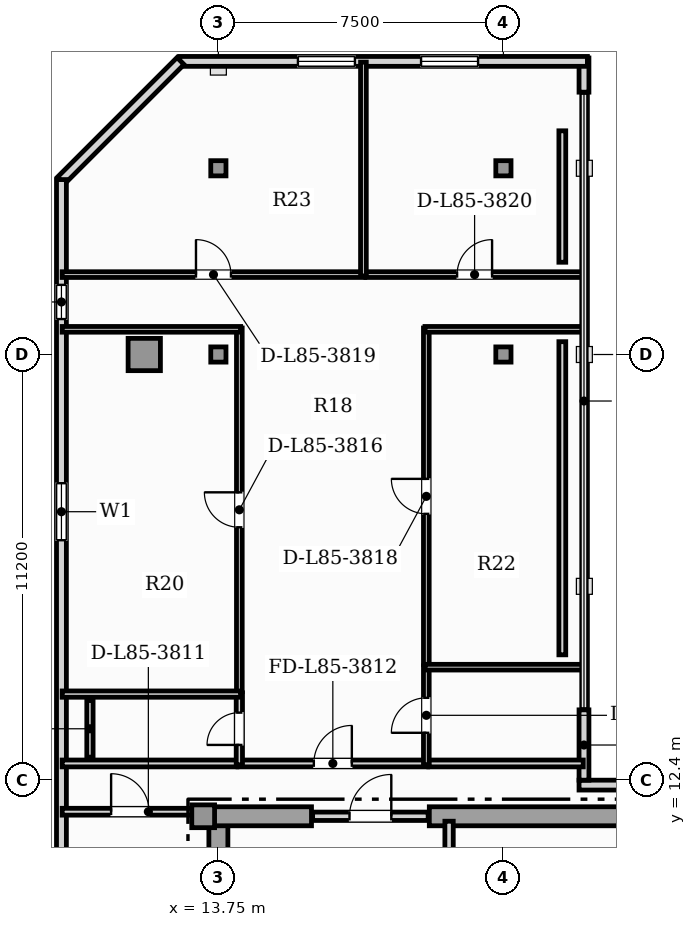
"""IFC4 building model, lengths in metres.
Left out: names, types, materials, properties, quantities, classifications, styles, units other than length and angle.
Written with IfcOpenShell. Run it as: python <this file> out.ifc"""

import sys

from ifc_helpers import new_model, si_unit, direction, frame, frame_2d, origin, origin_2d, place, context, subcontext, project, spatial, rectangle, hollow_rectangle, extrude, element, fill, save


model = new_model("IFC4")
c1 = context("Model", 3, precision=1e-05, world=origin(), true_north=direction((0.0, 1.0)))
c2 = subcontext(c1, "Body", "Model", "MODEL_VIEW")
j1 = project(units=[si_unit("LENGTHUNIT", "METRE"), si_unit("PLANEANGLEUNIT", "RADIAN")], contexts=[c1])
p1 = place(None, origin())
s1 = spatial("IfcSite", under=j1, at=p1, CompositionType="ELEMENT")
p2 = place(p1, origin())
s2 = spatial("IfcBuilding", under=s1, at=p2, CompositionType="ELEMENT")
p3 = place(p2, frame((0.0, 0.0, 345.2)))
s3 = spatial("IfcBuildingStorey", under=s2, at=p3, CompositionType="ELEMENT", Elevation=345.2)
p4 = place(p3, frame((13.75, 0.92, 0.0), z_axis=(0.0, 0.0, 1.0), x_axis=(0.0, 1.0, 0.0)))
e1 = element("IfcWall", 1, at=p4, inside=s3, PredefinedType="SHEAR", context=c2, shape_type="SweptSolid", body=[
    extrude(rectangle(XDim=10.53, YDim=0.5, at=frame_2d((5.265, 0.0))), origin(), (0.0, 0.0, 1.0), 3.59),
])
p5 = place(p3, frame((13.25, 11.45, 0.0), z_axis=(0.0, 0.0, 1.0), x_axis=(1.0, 0.0, 0.0)))
e2 = element("IfcWall", 2, at=p5, inside=s3, PredefinedType="SHEAR", context=c2, shape_type="SweptSolid", body=[
    extrude(rectangle(XDim=2.95, YDim=0.5, at=frame_2d((1.475, 0.0))), origin(), (0.0, 0.0, 1.0), 3.59),
])
p6 = place(p3, frame((19.3, 11.45, 0.0), z_axis=(0.0, 0.0, 1.0), x_axis=(1.0, 0.0, 0.0)))
e3 = element("IfcWall", 3, at=p6, inside=s3, PredefinedType="SHEAR", context=c2, shape_type="SweptSolid", body=[
    extrude(rectangle(XDim=7.3, YDim=0.5, at=frame_2d((3.65, 0.0))), origin(), (0.0, 0.0, 1.0), 3.59),
])
p7 = place(p3, frame((13.35, 11.45, 0.0), z_axis=(0.0, 0.0, 1.0), x_axis=(1.0, 0.0, 0.0)))
e4 = element("IfcColumn", 4, at=p7, inside=s3, PredefinedType="COLUMN", context=c2, shape_type="SweptSolid", body=[
    extrude(rectangle(XDim=0.6, YDim=0.6, at=origin_2d()), origin(), (0.0, 0.0, 1.0), 3.85),
])
p8 = place(p3, frame((11.8, 23.6, 0.0), z_axis=(0.0, 0.0, 1.0), x_axis=(1.0, 0.0, 0.0)))
e5 = element("IfcColumn", 5, at=p8, inside=s3, PredefinedType="USERDEFINED", context=c2, shape_type="SweptSolid", body=[
    extrude(hollow_rectangle(XDim=0.85, YDim=0.85, WallThickness=0.05, at=origin_2d()), origin(), (0.0, 0.0, 1.0), 3.85),
])
for number, where, z_axis, x_axis in (
    (6, (13.75, 23.6, 0.0), (0.0, 0.0, 1.0), (1.0, 0.0, 0.0)),
    (7, (21.25, 23.6, 0.0), (0.0, 0.0, 1.0), (1.0, 0.0, 0.0)),
    (8, (13.75, 28.5, 0.0), (0.0, 0.0, 1.0), (1.0, 0.0, 0.0)),
    (9, (21.25, 28.5, 0.0), (0.0, 0.0, 1.0), (1.0, 0.0, 0.0)),
):
    element("IfcColumn", number, at=place(p3, frame(where, z_axis=z_axis, x_axis=x_axis)), inside=s3, PredefinedType="COLUMN", context=c2, shape_type="SweptSolid", body=[
        extrude(hollow_rectangle(XDim=0.4, YDim=0.4, WallThickness=0.02, at=origin_2d()), origin(), (0.0, 0.0, 1.0), 3.85),
    ])
p9 = place(p3, frame((34.26, 12.27, 0.0), z_axis=(0.0, 0.0, 1.0), x_axis=(-1.0, 0.0, 0.0)))
e10 = element("IfcWall", 10, at=p9, inside=s3, PredefinedType="SOLIDWALL", context=c2, shape_type="SweptSolid", body=[
    extrude(rectangle(XDim=11.02, YDim=0.26, at=frame_2d((5.51, 0.0))), origin(), (0.0, 0.0, 1.0), 3.59),
])
p10 = place(p3, frame((23.37, 12.4, 0.0), z_axis=(0.0, 0.0, 1.0), x_axis=(0.0, 1.0, 0.0)))
e11 = element("IfcWall", 11, at=p10, inside=s3, PredefinedType="SOLIDWALL", context=c2, shape_type="SweptSolid", body=[
    extrude(rectangle(XDim=1.85, YDim=0.26, at=frame_2d((0.925, 0.0))), origin(), (0.0, 0.0, 1.0), 3.13),
])
p11 = place(p3, frame((23.37, 30.502, 0.0), z_axis=(0.0, 0.0, 1.0), x_axis=(0.0, 1.0, 0.0)))
e12 = element("IfcWall", 12, at=p11, inside=s3, PredefinedType="SOLIDWALL", context=c2, shape_type="SweptSolid", body=[
    extrude(rectangle(XDim=0.9, YDim=0.26, at=frame_2d((0.45, 0.0))), origin(), (0.0, 0.0, 1.0), 3.59),
])
p12 = place(p3, frame((23.46, 31.312, 0.0), z_axis=(0.0, 0.0, 1.0), x_axis=(-1.0, 0.0, 0.0)))
e13 = element("IfcWall", 13, at=p12, inside=s3, PredefinedType="SOLIDWALL", context=c2, shape_type="SweptSolid", body=[
    extrude(rectangle(XDim=10.729, YDim=0.26, at=frame_2d((5.365, 0.0))), origin(), (0.0, 0.0, 1.0), 3.59),
])
p13 = place(p12, frame((6.117, 0.0, 0.9)))
e14 = element("IfcOpeningElement", 14, at=p13, cuts=e13, PredefinedType="OPENING", context=c2, shape_type="SweptSolid", body=[
    extrude(rectangle(XDim=1.5, YDim=1.95, at=frame_2d((0.75, 0.975))), frame((0.0, 0.14, 0.0), z_axis=(0.0, -1.0, 0.0), x_axis=(1.0, 0.0, 0.0)), (0.0, 0.0, 1.0), 0.28),
])
p14 = place(p12, frame((2.877, 0.0, 0.9)))
e15 = element("IfcOpeningElement", 15, at=p14, cuts=e13, PredefinedType="OPENING", context=c2, shape_type="SweptSolid", body=[
    extrude(rectangle(XDim=1.5, YDim=1.95, at=frame_2d((0.75, 0.975))), frame((0.0, 0.14, 0.0), z_axis=(0.0, -1.0, 0.0), x_axis=(1.0, 0.0, 0.0)), (0.0, 0.0, 1.0), 0.28),
])
p15 = place(p3, frame((12.754, 31.322, 0.0), z_axis=(0.0, 0.0, 1.0), x_axis=(-0.707106781187, -0.707106781187, 0.0)))
e16 = element("IfcWall", 16, at=p15, inside=s3, PredefinedType="SOLIDWALL", context=c2, shape_type="SweptSolid", body=[
    extrude(rectangle(XDim=4.445, YDim=0.26, at=frame_2d((2.223, 0.0))), origin(), (0.0, 0.0, 1.0), 3.59),
])
p16 = place(p3, frame((9.621, 28.202, 0.0), z_axis=(0.0, 0.0, 1.0), x_axis=(0.0, -1.0, 0.0)))
e17 = element("IfcWall", 17, at=p16, inside=s3, PredefinedType="SOLIDWALL", context=c2, shape_type="SweptSolid", body=[
    extrude(rectangle(XDim=24.962, YDim=0.26, at=frame_2d((12.481, 0.0))), origin(), (0.0, 0.0, 1.0), 3.59),
])
p17 = place(p16, frame((19.372, 0.0, 0.9)))
e18 = element("IfcOpeningElement", 18, at=p17, cuts=e17, PredefinedType="OPENING", context=c2, shape_type="SweptSolid", body=[
    extrude(rectangle(XDim=1.5, YDim=1.95, at=frame_2d((0.75, 0.975))), frame((0.0, 0.14, 0.0), z_axis=(0.0, -1.0, 0.0), x_axis=(1.0, 0.0, 0.0)), (0.0, 0.0, 1.0), 0.28),
])
p18 = place(p16, frame((2.77, 0.0, 0.95)))
e19 = element("IfcOpeningElement", 19, at=p18, cuts=e17, PredefinedType="OPENING", context=c2, shape_type="SweptSolid", body=[
    extrude(rectangle(XDim=0.9, YDim=1.5, at=frame_2d((0.45, 0.75))), frame((0.0, 0.14, 0.0), z_axis=(0.0, -1.0, 0.0), x_axis=(1.0, 0.0, 0.0)), (0.0, 0.0, 1.0), 0.28),
])
p19 = place(p16, frame((7.989, 0.0, 0.9)))
e20 = element("IfcOpeningElement", 20, at=p19, cuts=e17, PredefinedType="OPENING", context=c2, shape_type="SweptSolid", body=[
    extrude(rectangle(XDim=1.5, YDim=1.95, at=frame_2d((0.75, 0.975))), frame((0.0, 0.14, 0.0), z_axis=(0.0, -1.0, 0.0), x_axis=(1.0, 0.0, 0.0)), (0.0, 0.0, 1.0), 0.28),
])
p20 = place(p3, frame((19.82, 8.52, 0.0), z_axis=(0.0, 0.0, 1.0), x_axis=(0.0, 1.0, 0.0)))
e21 = element("IfcWall", 21, at=p20, inside=s3, PredefinedType="SOLIDWALL", context=c2, shape_type="SweptSolid", body=[
    extrude(rectangle(XDim=2.8, YDim=0.22, at=frame_2d((1.4, 0.0))), origin(), (0.0, 0.0, 1.0), 3.046),
])
p21 = place(p20, frame((0.85, 0.0, 0.0)))
e22 = element("IfcOpeningElement", 22, at=p21, cuts=e21, PredefinedType="OPENING", context=c2, shape_type="SweptSolid", body=[
    extrude(rectangle(XDim=1.1, YDim=2.2, at=frame_2d((0.55, 1.1))), frame((0.0, 0.12, 0.0), z_axis=(0.0, -1.0, 0.0), x_axis=(1.0, 0.0, 0.0)), (0.0, 0.0, 1.0), 0.24),
])
p22 = place(p3, frame((16.23, 11.45, 0.0), z_axis=(0.0, 0.0, 1.0), x_axis=(1.0, 0.0, 0.0)))
e23 = element("IfcWall", 23, at=p22, inside=s3, PredefinedType="SOLIDWALL", context=c2, shape_type="SweptSolid", body=[
    extrude(rectangle(XDim=3.04, YDim=0.22, at=frame_2d((1.52, 0.0))), origin(), (0.0, 0.0, 1.0), 3.59),
])
p23 = place(p22, frame((0.97, 0.0, 0.0)))
e24 = element("IfcOpeningElement", 24, at=p23, cuts=e23, PredefinedType="OPENING", context=c2, shape_type="SweptSolid", body=[
    extrude(rectangle(XDim=1.1, YDim=2.2, at=frame_2d((0.55, 1.1))), frame((0.0, 0.12, 0.0), z_axis=(0.0, -1.0, 0.0), x_axis=(1.0, 0.0, 0.0)), (0.0, 0.0, 1.0), 0.24),
])
p24 = place(p3, frame((9.64, 11.57, 0.0), z_axis=(0.0, 0.0, 1.0), x_axis=(1.0, 0.0, 0.0)))
e25 = element("IfcWall", 25, at=p24, inside=s3, PredefinedType="PARTITIONING", context=c2, shape_type="SweptSolid", body=[
    extrude(rectangle(XDim=3.575, YDim=0.18, at=frame_2d((1.788, 0.0))), origin(), (0.0, 0.0, 1.0), 3.59),
])
p25 = place(p24, frame((1.287, 0.0, 0.0)))
e26 = element("IfcOpeningElement", 26, at=p25, cuts=e25, PredefinedType="OPENING", context=c2, shape_type="SweptSolid", body=[
    extrude(rectangle(XDim=1.0, YDim=2.15, at=frame_2d((0.5, 1.075))), frame((0.0, 0.1, 0.0), z_axis=(0.0, -1.0, 0.0), x_axis=(1.0, 0.0, 0.0)), (0.0, 0.0, 1.0), 0.2),
])
p26 = place(p3, frame((14.267, 12.84, 0.0), z_axis=(0.0, 0.0, 1.0), x_axis=(1.0, 0.0, 0.0)))
e27 = element("IfcWall", 27, at=p26, inside=s3, PredefinedType="PARTITIONING", context=c2, shape_type="SweptSolid", body=[
    extrude(rectangle(XDim=4.99, YDim=0.18, at=frame_2d((2.495, 0.0))), origin(), (0.0, 0.0, 1.0), 3.59),
])
p27 = place(p26, frame((1.995, 0.0, 0.0)))
e28 = element("IfcOpeningElement", 28, at=p27, cuts=e27, PredefinedType="OPENING", context=c2, shape_type="SweptSolid", body=[
    extrude(rectangle(XDim=1.0, YDim=2.15, at=frame_2d((0.5, 1.075))), frame((0.0, 0.1, 0.0), z_axis=(0.0, -1.0, 0.0), x_axis=(1.0, 0.0, 0.0)), (0.0, 0.0, 1.0), 0.2),
])
p28 = place(p3, frame((9.64, 12.84, 0.0), z_axis=(0.0, 0.0, 1.0), x_axis=(1.0, 0.0, 0.0)))
e29 = element("IfcWall", 29, at=p28, inside=s3, PredefinedType="PARTITIONING", context=c2, shape_type="SweptSolid", body=[
    extrude(rectangle(XDim=4.597, YDim=0.18, at=frame_2d((2.298, 0.0))), origin(), (0.0, 0.0, 1.0), 3.59),
])
p29 = place(p3, frame((19.287, 12.84, 0.0), z_axis=(0.0, 0.0, 1.0), x_axis=(1.0, 0.0, 0.0)))
e30 = element("IfcWall", 30, at=p29, inside=s3, PredefinedType="PARTITIONING", context=c2, shape_type="SweptSolid", body=[
    extrude(rectangle(XDim=4.064, YDim=0.18, at=frame_2d((2.032, 0.0))), origin(), (0.0, 0.0, 1.0), 3.59),
])
p30 = place(p3, frame((14.302, 12.805, 0.0), z_axis=(0.0, 0.0, 1.0), x_axis=(0.0, 1.0, 0.0)))
e31 = element("IfcWall", 31, at=p30, inside=s3, PredefinedType="PLUMBINGWALL", context=c2, shape_type="SweptSolid", body=[
    extrude(rectangle(XDim=1.895, YDim=0.165, at=frame_2d((0.948, 0.0))), origin(), (0.0, 0.0, 1.0), 3.59),
])
p31 = place(p30, frame((0.522, 0.0, 0.0)))
e32 = element("IfcOpeningElement", 32, at=p31, cuts=e31, PredefinedType="OPENING", context=c2, shape_type="SweptSolid", body=[
    extrude(rectangle(XDim=0.85, YDim=2.1, at=frame_2d((0.425, 1.05))), frame((0.0, 0.093, 0.0), z_axis=(0.0, -1.0, 0.0), x_axis=(1.0, 0.0, 0.0)), (0.0, 0.0, 1.0), 0.185),
])
p32 = place(p3, frame((14.302, 14.73, 0.0), z_axis=(0.0, 0.0, 1.0), x_axis=(0.0, 1.0, 0.0)))
e33 = element("IfcWall", 33, at=p32, inside=s3, PredefinedType="PARTITIONING", context=c2, shape_type="SweptSolid", body=[
    extrude(rectangle(XDim=9.568, YDim=0.15, at=frame_2d((4.784, 0.0))), origin(), (0.0, 0.0, 1.0), 3.59),
])
p33 = place(p32, frame((4.324, 0.0, 0.0)))
e34 = element("IfcOpeningElement", 34, at=p33, cuts=e33, PredefinedType="OPENING", context=c2, shape_type="SweptSolid", body=[
    extrude(rectangle(XDim=0.92, YDim=2.1, at=frame_2d((0.46, 1.05))), frame((0.0, 0.085, 0.0), z_axis=(0.0, -1.0, 0.0), x_axis=(1.0, 0.0, 0.0)), (0.0, 0.0, 1.0), 0.17),
])
p34 = place(p3, frame((9.64, 24.262, 0.0), z_axis=(0.0, 0.0, 1.0), x_axis=(1.0, 0.0, 0.0)))
e35 = element("IfcWall", 35, at=p34, inside=s3, PredefinedType="PARTITIONING", context=c2, shape_type="SweptSolid", body=[
    extrude(rectangle(XDim=4.697, YDim=0.15, at=frame_2d((2.348, 0.0))), origin(), (0.0, 0.0, 1.0), 3.59),
])
p35 = place(p3, frame((19.222, 12.805, 0.0), z_axis=(0.0, 0.0, 1.0), x_axis=(0.0, 1.0, 0.0)))
e36 = element("IfcWall", 36, at=p35, inside=s3, PredefinedType="PARTITIONING", context=c2, shape_type="SweptSolid", body=[
    extrude(rectangle(XDim=2.603, YDim=0.15, at=frame_2d((1.302, 0.0))), origin(), (0.0, 0.0, 1.0), 3.59),
])
p36 = place(p35, frame((0.842, 0.0, 0.0)))
e37 = element("IfcOpeningElement", 37, at=p36, cuts=e36, PredefinedType="OPENING", context=c2, shape_type="SweptSolid", body=[
    extrude(rectangle(XDim=0.92, YDim=2.1, at=frame_2d((0.46, 1.05))), frame((0.0, 0.085, 0.0), z_axis=(0.0, -1.0, 0.0), x_axis=(1.0, 0.0, 0.0)), (0.0, 0.0, 1.0), 0.17),
])
p37 = place(p3, frame((19.222, 15.438, 0.0), z_axis=(0.0, 0.0, 1.0), x_axis=(0.0, 1.0, 0.0)))
e38 = element("IfcWall", 38, at=p37, inside=s3, PredefinedType="PARTITIONING", context=c2, shape_type="SweptSolid", body=[
    extrude(rectangle(XDim=8.86, YDim=0.15, at=frame_2d((4.43, 0.0))), origin(), (0.0, 0.0, 1.0), 3.59),
])
p38 = place(p37, frame((3.97, 0.0, 0.0)))
e39 = element("IfcOpeningElement", 39, at=p38, cuts=e38, PredefinedType="OPENING", context=c2, shape_type="SweptSolid", body=[
    extrude(rectangle(XDim=0.92, YDim=2.1, at=frame_2d((0.46, 1.05))), frame((0.0, 0.085, 0.0), z_axis=(0.0, -1.0, 0.0), x_axis=(1.0, 0.0, 0.0)), (0.0, 0.0, 1.0), 0.17),
])
p39 = place(p3, frame((19.187, 24.262, 0.0), z_axis=(0.0, 0.0, 1.0), x_axis=(1.0, 0.0, 0.0)))
e40 = element("IfcWall", 40, at=p39, inside=s3, PredefinedType="PARTITIONING", context=c2, shape_type="SweptSolid", body=[
    extrude(rectangle(XDim=4.165, YDim=0.15, at=frame_2d((2.083, 0.0))), origin(), (0.0, 0.0, 1.0), 3.59),
])
p40 = place(p3, frame((9.64, 25.702, 0.0), z_axis=(0.0, 0.0, 1.0), x_axis=(1.0, 0.0, 0.0)))
e41 = element("IfcWall", 41, at=p40, inside=s3, PredefinedType="PARTITIONING", context=c2, shape_type="SweptSolid", body=[
    extrude(rectangle(XDim=7.961, YDim=0.15, at=frame_2d((3.98, 0.0))), origin(), (0.0, 0.0, 1.0), 3.59),
])
p41 = place(p40, frame((3.521, 0.0, 0.0)))
e42 = element("IfcOpeningElement", 42, at=p41, cuts=e41, PredefinedType="OPENING", context=c2, shape_type="SweptSolid", body=[
    extrude(rectangle(XDim=0.92, YDim=2.1, at=frame_2d((0.46, 1.05))), frame((0.0, 0.085, 0.0), z_axis=(0.0, -1.0, 0.0), x_axis=(1.0, 0.0, 0.0)), (0.0, 0.0, 1.0), 0.17),
])
p42 = place(p3, frame((17.631, 25.702, 0.0), z_axis=(0.0, 0.0, 1.0), x_axis=(1.0, 0.0, 0.0)))
e43 = element("IfcWall", 43, at=p42, inside=s3, PredefinedType="PARTITIONING", context=c2, shape_type="SweptSolid", body=[
    extrude(rectangle(XDim=5.721, YDim=0.15, at=frame_2d((2.86, 0.0))), origin(), (0.0, 0.0, 1.0), 3.59),
])
p43 = place(p42, frame((2.4, 0.0, 0.0)))
e44 = element("IfcOpeningElement", 44, at=p43, cuts=e43, PredefinedType="OPENING", context=c2, shape_type="SweptSolid", body=[
    extrude(rectangle(XDim=0.92, YDim=2.1, at=frame_2d((0.46, 1.05))), frame((0.0, 0.085, 0.0), z_axis=(0.0, -1.0, 0.0), x_axis=(1.0, 0.0, 0.0)), (0.0, 0.0, 1.0), 0.17),
])
p44 = place(p3, frame((9.64, 14.665, 0.0), z_axis=(0.0, 0.0, 1.0), x_axis=(1.0, 0.0, 0.0)))
e45 = element("IfcWall", 45, at=p44, inside=s3, PredefinedType="PLUMBINGWALL", context=c2, shape_type="SweptSolid", body=[
    extrude(rectangle(XDim=4.697, YDim=0.165, at=frame_2d((2.348, 0.0))), origin(), (0.0, 0.0, 1.0), 3.59),
])
p45 = place(p3, frame((19.187, 15.373, 0.0), z_axis=(0.0, 0.0, 1.0), x_axis=(1.0, 0.0, 0.0)))
e46 = element("IfcWall", 46, at=p45, inside=s3, PredefinedType="PARTITIONING", context=c2, shape_type="SweptSolid", body=[
    extrude(rectangle(XDim=4.165, YDim=0.15, at=frame_2d((2.083, 0.0))), origin(), (0.0, 0.0, 1.0), 3.59),
])
p46 = place(p3, frame((17.566, 25.667, 0.0), z_axis=(0.0, 0.0, 1.0), x_axis=(0.0, 1.0, 0.0)))
e47 = element("IfcWall", 47, at=p46, inside=s3, PredefinedType="PARTITIONING", context=c2, shape_type="SweptSolid", body=[
    extrude(rectangle(XDim=5.625, YDim=0.15, at=frame_2d((2.813, 0.0))), origin(), (0.0, 0.0, 1.0), 3.287),
])
p47 = place(p3, frame((10.371, 13.005, 0.0), z_axis=(0.0, 0.0, 1.0), x_axis=(0.0, 1.0, 0.0)))
e48 = element("IfcWall", 48, at=p47, inside=s3, PredefinedType="PLUMBINGWALL", context=c2, shape_type="SweptSolid", body=[
    extrude(rectangle(XDim=1.495, YDim=0.165, at=frame_2d((0.748, 0.0))), origin(), (0.0, 0.0, 1.0), 3.59),
])
p48 = place(p3, frame((22.8, 23.938, 0.0), z_axis=(0.0, 0.0, 1.0), x_axis=(0.0, -1.0, 0.0)))
e49 = element("IfcWall", 49, at=p48, inside=s3, PredefinedType="PARTITIONING", context=c2, shape_type="SweptSolid", body=[
    extrude(rectangle(XDim=8.24, YDim=0.18, at=frame_2d((4.12, 0.0))), origin(), (0.0, 0.0, 1.0), 3.59),
])
p49 = place(p3, frame((22.8, 29.486, 0.0), z_axis=(0.0, 0.0, 1.0), x_axis=(0.0, -1.0, 0.0)))
e50 = element("IfcWall", 50, at=p49, inside=s3, PredefinedType="PARTITIONING", context=c2, shape_type="SweptSolid", body=[
    extrude(rectangle(XDim=3.458, YDim=0.18, at=frame_2d((1.729, 0.0))), origin(), (0.0, 0.0, 1.0), 3.59),
])
p50 = place(p18, origin())
e51 = element("IfcWindow", 51, at=p50, inside=s3, PartitioningType="SINGLE_PANEL", PredefinedType="WINDOW", context=c2, shape_type="SweptSolid", body=[
    extrude(rectangle(XDim=0.9, YDim=1.5, at=frame_2d((0.45, 0.75))), frame((0.0, 0.03, 0.0), z_axis=(0.0, -1.0, 0.0), x_axis=(1.0, 0.0, 0.0)), (0.0, 0.0, 1.0), 0.06),
])
fill(e19, e51)
p51 = place(p19, origin())
e52 = element("IfcWindow", 52, at=p51, inside=s3, PartitioningType="SINGLE_PANEL", PredefinedType="WINDOW", context=c2, shape_type="SweptSolid", body=[
    extrude(rectangle(XDim=1.5, YDim=1.95, at=frame_2d((0.75, 0.975))), frame((0.0, 0.03, 0.0), z_axis=(0.0, -1.0, 0.0), x_axis=(1.0, 0.0, 0.0)), (0.0, 0.0, 1.0), 0.06),
])
fill(e20, e52)
p52 = place(p13, origin())
e53 = element("IfcWindow", 53, at=p52, inside=s3, PartitioningType="SINGLE_PANEL", PredefinedType="WINDOW", context=c2, shape_type="SweptSolid", body=[
    extrude(rectangle(XDim=1.5, YDim=1.95, at=frame_2d((0.75, 0.975))), frame((0.0, 0.03, 0.0), z_axis=(0.0, -1.0, 0.0), x_axis=(1.0, 0.0, 0.0)), (0.0, 0.0, 1.0), 0.06),
])
fill(e14, e53)
p53 = place(p14, origin())
e54 = element("IfcWindow", 54, at=p53, inside=s3, PartitioningType="SINGLE_PANEL", PredefinedType="WINDOW", context=c2, shape_type="SweptSolid", body=[
    extrude(rectangle(XDim=1.5, YDim=1.95, at=frame_2d((0.75, 0.975))), frame((0.0, 0.03, 0.0), z_axis=(0.0, -1.0, 0.0), x_axis=(1.0, 0.0, 0.0)), (0.0, 0.0, 1.0), 0.06),
])
fill(e15, e54)
p54 = place(p23, origin())
e55 = element("IfcDoor", 55, at=p54, inside=s3, OperationType="SINGLE_SWING_RIGHT", PredefinedType="DOOR", context=c2, shape_type="SweptSolid", body=[
    extrude(rectangle(XDim=1.1, YDim=2.2, at=frame_2d((0.55, 1.1))), frame((0.0, 0.025, 0.0), z_axis=(0.0, -1.0, 0.0), x_axis=(1.0, 0.0, 0.0)), (0.0, 0.0, 1.0), 0.05),
])
fill(e24, e55)
p55 = place(p25, origin())
e56 = element("IfcDoor", 56, at=p55, inside=s3, OperationType="SINGLE_SWING_LEFT", PredefinedType="DOOR", context=c2, shape_type="SweptSolid", body=[
    extrude(rectangle(XDim=1.0, YDim=2.15, at=frame_2d((0.5, 1.075))), frame((0.0, 0.025, 0.0), z_axis=(0.0, -1.0, 0.0), x_axis=(1.0, 0.0, 0.0)), (0.0, 0.0, 1.0), 0.05),
])
fill(e26, e56)
p56 = place(p27, origin())
e57 = element("IfcDoor", 57, at=p56, inside=s3, OperationType="SINGLE_SWING_RIGHT", PredefinedType="DOOR", context=c2, shape_type="SweptSolid", body=[
    extrude(rectangle(XDim=1.0, YDim=2.15, at=frame_2d((0.5, 1.075))), frame((0.0, 0.025, 0.0), z_axis=(0.0, -1.0, 0.0), x_axis=(1.0, 0.0, 0.0)), (0.0, 0.0, 1.0), 0.05),
])
fill(e28, e57)
p57 = place(p31, origin())
e58 = element("IfcDoor", 58, at=p57, inside=s3, OperationType="SINGLE_SWING_LEFT", PredefinedType="DOOR", context=c2, shape_type="SweptSolid", body=[
    extrude(rectangle(XDim=0.85, YDim=2.1, at=frame_2d((0.425, 1.05))), frame((0.0, 0.025, 0.0), z_axis=(0.0, -1.0, 0.0), x_axis=(1.0, 0.0, 0.0)), (0.0, 0.0, 1.0), 0.05),
])
fill(e32, e58)
p58 = place(p33, origin())
e59 = element("IfcDoor", 59, at=p58, inside=s3, OperationType="SINGLE_SWING_RIGHT", PredefinedType="DOOR", context=c2, shape_type="SweptSolid", body=[
    extrude(rectangle(XDim=0.92, YDim=2.1, at=frame_2d((0.46, 1.05))), frame((0.0, 0.025, 0.0), z_axis=(0.0, -1.0, 0.0), x_axis=(1.0, 0.0, 0.0)), (0.0, 0.0, 1.0), 0.05),
])
fill(e34, e59)
p59 = place(p36, origin())
e60 = element("IfcDoor", 60, at=p59, inside=s3, OperationType="SINGLE_SWING_LEFT", PredefinedType="DOOR", context=c2, shape_type="SweptSolid", body=[
    extrude(rectangle(XDim=0.92, YDim=2.1, at=frame_2d((0.46, 1.05))), frame((0.0, 0.025, 0.0), z_axis=(0.0, -1.0, 0.0), x_axis=(1.0, 0.0, 0.0)), (0.0, 0.0, 1.0), 0.05),
])
fill(e37, e60)
p60 = place(p38, origin())
e61 = element("IfcDoor", 61, at=p60, inside=s3, OperationType="SINGLE_SWING_RIGHT", PredefinedType="DOOR", context=c2, shape_type="SweptSolid", body=[
    extrude(rectangle(XDim=0.92, YDim=2.1, at=frame_2d((0.46, 1.05))), frame((0.0, 0.025, 0.0), z_axis=(0.0, -1.0, 0.0), x_axis=(1.0, 0.0, 0.0)), (0.0, 0.0, 1.0), 0.05),
])
fill(e39, e61)
p61 = place(p41, origin())
e62 = element("IfcDoor", 62, at=p61, inside=s3, OperationType="SINGLE_SWING_LEFT", PredefinedType="DOOR", context=c2, shape_type="SweptSolid", body=[
    extrude(rectangle(XDim=0.92, YDim=2.1, at=frame_2d((0.46, 1.05))), frame((0.0, 0.025, 0.0), z_axis=(0.0, -1.0, 0.0), x_axis=(1.0, 0.0, 0.0)), (0.0, 0.0, 1.0), 0.05),
])
fill(e42, e62)
p62 = place(p43, origin())
e63 = element("IfcDoor", 63, at=p62, inside=s3, OperationType="SINGLE_SWING_RIGHT", PredefinedType="DOOR", context=c2, shape_type="SweptSolid", body=[
    extrude(rectangle(XDim=0.92, YDim=2.1, at=frame_2d((0.46, 1.05))), frame((0.0, 0.025, 0.0), z_axis=(0.0, -1.0, 0.0), x_axis=(1.0, 0.0, 0.0)), (0.0, 0.0, 1.0), 0.05),
])
fill(e44, e63)
save(model, sys.argv[1])
